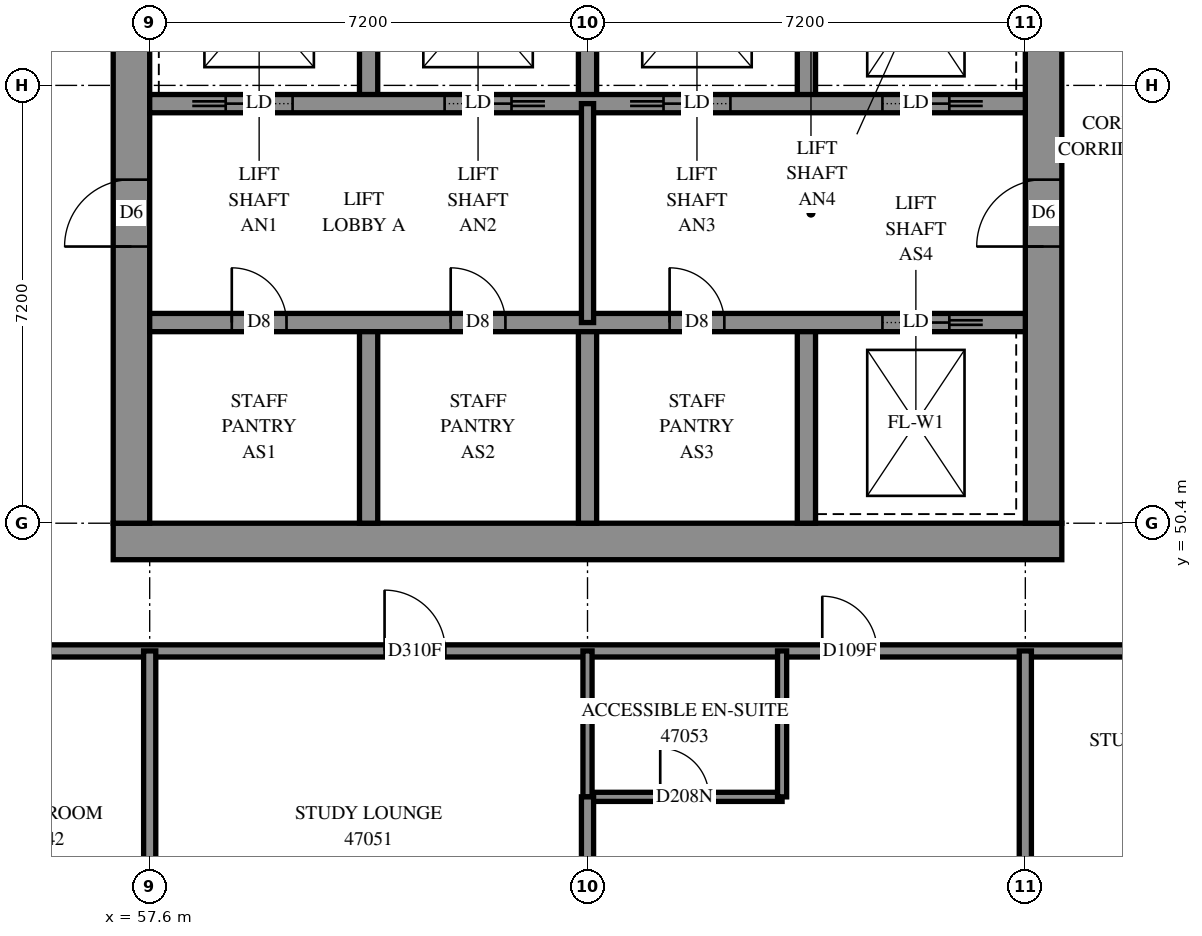
"""IFC4 building model, lengths in metres.
Left out: names, types, materials, properties, quantities, classifications, styles, units other than length and angle.
Written with IfcOpenShell. Run it as: python <this file> out.ifc"""

import sys

from ifc_helpers import new_model, si_unit, direction, frame, frame_2d, origin, place, context, subcontext, project, spatial, rectangle, extrude, element, fill, save


model = new_model("IFC4")
c1 = context("Model", 3, precision=1e-05, world=origin(), true_north=direction((0.0, 1.0)))
c2 = subcontext(c1, "Body", "Model", "MODEL_VIEW")
j1 = project(units=[si_unit("LENGTHUNIT", "METRE"), si_unit("PLANEANGLEUNIT", "RADIAN")], contexts=[c1])
p1 = place(None, origin())
s1 = spatial("IfcSite", under=j1, at=p1, CompositionType="ELEMENT")
p2 = place(p1, origin())
s2 = spatial("IfcBuilding", under=s1, at=p2, CompositionType="ELEMENT")
p3 = place(p2, frame((0.0, 0.0, 172.8)))
s3 = spatial("IfcBuildingStorey", under=s2, at=p3, CompositionType="ELEMENT", Elevation=172.8)
p4 = place(p3, frame((57.0, 50.1, -0.3), z_axis=(0.0, 0.0, 1.0), x_axis=(1.0, 0.0, 0.0)))
e1 = element("IfcWall", 1, at=p4, inside=s3, PredefinedType="SHEAR", context=c2, shape_type="SweptSolid", body=[
    extrude(rectangle(XDim=15.6, YDim=0.6, at=frame_2d((7.8, 0.0))), origin(), (0.0, 0.0, 1.0), 2.7),
])
p5 = place(p3, frame((57.3, 50.4, -0.3), z_axis=(0.0, 0.0, 1.0), x_axis=(0.0, 1.0, 0.0)))
e2 = element("IfcWall", 2, at=p5, inside=s3, PredefinedType="SHEAR", context=c2, shape_type="SweptSolid", body=[
    extrude(rectangle(XDim=14.4, YDim=0.6, at=frame_2d((7.2, 0.0))), origin(), (0.0, 0.0, 1.0), 2.7),
])
p6 = place(p5, frame((4.55, 0.0, 0.3)))
e3 = element("IfcOpeningElement", 3, at=p6, cuts=e2, PredefinedType="OPENING", context=c2, shape_type="SweptSolid", body=[
    extrude(rectangle(XDim=1.1, YDim=2.1, at=frame_2d((0.55, 1.05))), frame((0.0, 0.31, 0.0), z_axis=(0.0, -1.0, 0.0), x_axis=(1.0, 0.0, 0.0)), (0.0, 0.0, 1.0), 0.62),
])
p7 = place(p5, frame((11.35, 0.0, 0.3)))
e4 = element("IfcOpeningElement", 4, at=p7, cuts=e2, PredefinedType="OPENING", context=c2, shape_type="SweptSolid", body=[
    extrude(rectangle(XDim=1.1, YDim=2.1, at=frame_2d((0.55, 1.05))), frame((0.0, 0.31, 0.0), z_axis=(0.0, -1.0, 0.0), x_axis=(1.0, 0.0, 0.0)), (0.0, 0.0, 1.0), 0.62),
])
p8 = place(p3, frame((72.3, 50.4, -0.3), z_axis=(0.0, 0.0, 1.0), x_axis=(0.0, 1.0, 0.0)))
e5 = element("IfcWall", 5, at=p8, inside=s3, PredefinedType="SHEAR", context=c2, shape_type="SweptSolid", body=[
    extrude(rectangle(XDim=14.4, YDim=0.6, at=frame_2d((7.2, 0.0))), origin(), (0.0, 0.0, 1.0), 2.7),
])
p9 = place(p8, frame((4.55, 0.0, 0.3)))
e6 = element("IfcOpeningElement", 6, at=p9, cuts=e5, PredefinedType="OPENING", context=c2, shape_type="SweptSolid", body=[
    extrude(rectangle(XDim=1.1, YDim=2.1, at=frame_2d((0.55, 1.05))), frame((0.0, 0.31, 0.0), z_axis=(0.0, -1.0, 0.0), x_axis=(1.0, 0.0, 0.0)), (0.0, 0.0, 1.0), 0.62),
])
p10 = place(p8, frame((11.35, 0.0, 0.3)))
e7 = element("IfcOpeningElement", 7, at=p10, cuts=e5, PredefinedType="OPENING", context=c2, shape_type="SweptSolid", body=[
    extrude(rectangle(XDim=1.1, YDim=2.1, at=frame_2d((0.55, 1.05))), frame((0.0, 0.31, 0.0), z_axis=(0.0, -1.0, 0.0), x_axis=(1.0, 0.0, 0.0)), (0.0, 0.0, 1.0), 0.62),
])
for number, where, z_axis, x_axis in (
    (8, (61.2, 50.4, 0.0), (0.0, 0.0, 1.0), (0.0, 1.0, 0.0)),
    (9, (61.2, 57.3, 0.0), (0.0, 0.0, 1.0), (0.0, 1.0, 0.0)),
    (10, (64.8, 50.4, 0.0), (0.0, 0.0, 1.0), (0.0, 1.0, 0.0)),
    (11, (64.8, 57.3, 0.0), (0.0, 0.0, 1.0), (0.0, 1.0, 0.0)),
    (12, (68.4, 50.4, 0.0), (0.0, 0.0, 1.0), (0.0, 1.0, 0.0)),
    (13, (68.4, 57.3, 0.0), (0.0, 0.0, 1.0), (0.0, 1.0, 0.0)),
):
    element("IfcWall", number, at=place(p3, frame(where, z_axis=z_axis, x_axis=x_axis)), inside=s3, PredefinedType="SOLIDWALL", context=c2, shape_type="SweptSolid", body=[
        extrude(rectangle(XDim=3.3, YDim=0.3, at=frame_2d((1.65, 0.0))), origin(), (0.0, 0.0, 1.0), 3.1),
    ])
p11 = place(p3, frame((57.6, 53.7, 0.0), z_axis=(0.0, 0.0, 1.0), x_axis=(1.0, 0.0, 0.0)))
e14 = element("IfcWall", 14, at=p11, inside=s3, PredefinedType="SOLIDWALL", context=c2, shape_type="SweptSolid", body=[
    extrude(rectangle(XDim=14.4, YDim=0.3, at=frame_2d((7.2, 0.0))), origin(), (0.0, 0.0, 1.0), 3.1),
])
p12 = place(p11, frame((1.35, 0.0, 0.0)))
e15 = element("IfcOpeningElement", 15, at=p12, cuts=e14, PredefinedType="OPENING", context=c2, shape_type="SweptSolid", body=[
    extrude(rectangle(XDim=0.9, YDim=2.1, at=frame_2d((0.45, 1.05))), frame((0.0, 0.16, 0.0), z_axis=(0.0, -1.0, 0.0), x_axis=(1.0, 0.0, 0.0)), (0.0, 0.0, 1.0), 0.32),
])
p13 = place(p11, frame((4.95, 0.0, 0.0)))
e16 = element("IfcOpeningElement", 16, at=p13, cuts=e14, PredefinedType="OPENING", context=c2, shape_type="SweptSolid", body=[
    extrude(rectangle(XDim=0.9, YDim=2.1, at=frame_2d((0.45, 1.05))), frame((0.0, 0.16, 0.0), z_axis=(0.0, -1.0, 0.0), x_axis=(1.0, 0.0, 0.0)), (0.0, 0.0, 1.0), 0.32),
])
p14 = place(p11, frame((8.55, 0.0, 0.0)))
e17 = element("IfcOpeningElement", 17, at=p14, cuts=e14, PredefinedType="OPENING", context=c2, shape_type="SweptSolid", body=[
    extrude(rectangle(XDim=0.9, YDim=2.1, at=frame_2d((0.45, 1.05))), frame((0.0, 0.16, 0.0), z_axis=(0.0, -1.0, 0.0), x_axis=(1.0, 0.0, 0.0)), (0.0, 0.0, 1.0), 0.32),
])
p15 = place(p11, frame((12.05, 0.0, 0.0)))
e18 = element("IfcOpeningElement", 18, at=p15, cuts=e14, PredefinedType="OPENING", context=c2, shape_type="SweptSolid", body=[
    extrude(rectangle(XDim=1.1, YDim=2.1, at=frame_2d((0.55, 1.05))), frame((0.0, 0.16, 0.0), z_axis=(0.0, -1.0, 0.0), x_axis=(1.0, 0.0, 0.0)), (0.0, 0.0, 1.0), 0.32),
])
p16 = place(p3, frame((57.6, 57.3, 0.0), z_axis=(0.0, 0.0, 1.0), x_axis=(1.0, 0.0, 0.0)))
e19 = element("IfcWall", 19, at=p16, inside=s3, PredefinedType="SOLIDWALL", context=c2, shape_type="SweptSolid", body=[
    extrude(rectangle(XDim=14.4, YDim=0.3, at=frame_2d((7.2, 0.0))), origin(), (0.0, 0.0, 1.0), 3.1),
])
p17 = place(p16, frame((1.25, 0.0, 0.0)))
e20 = element("IfcOpeningElement", 20, at=p17, cuts=e19, PredefinedType="OPENING", context=c2, shape_type="SweptSolid", body=[
    extrude(rectangle(XDim=1.1, YDim=2.1, at=frame_2d((0.55, 1.05))), frame((0.0, 0.16, 0.0), z_axis=(0.0, -1.0, 0.0), x_axis=(1.0, 0.0, 0.0)), (0.0, 0.0, 1.0), 0.32),
])
p18 = place(p16, frame((4.85, 0.0, 0.0)))
e21 = element("IfcOpeningElement", 21, at=p18, cuts=e19, PredefinedType="OPENING", context=c2, shape_type="SweptSolid", body=[
    extrude(rectangle(XDim=1.1, YDim=2.1, at=frame_2d((0.55, 1.05))), frame((0.0, 0.16, 0.0), z_axis=(0.0, -1.0, 0.0), x_axis=(1.0, 0.0, 0.0)), (0.0, 0.0, 1.0), 0.32),
])
p19 = place(p16, frame((8.45, 0.0, 0.0)))
e22 = element("IfcOpeningElement", 22, at=p19, cuts=e19, PredefinedType="OPENING", context=c2, shape_type="SweptSolid", body=[
    extrude(rectangle(XDim=1.1, YDim=2.1, at=frame_2d((0.55, 1.05))), frame((0.0, 0.16, 0.0), z_axis=(0.0, -1.0, 0.0), x_axis=(1.0, 0.0, 0.0)), (0.0, 0.0, 1.0), 0.32),
])
p20 = place(p16, frame((12.05, 0.0, 0.0)))
e23 = element("IfcOpeningElement", 23, at=p20, cuts=e19, PredefinedType="OPENING", context=c2, shape_type="SweptSolid", body=[
    extrude(rectangle(XDim=1.1, YDim=2.1, at=frame_2d((0.55, 1.05))), frame((0.0, 0.16, 0.0), z_axis=(0.0, -1.0, 0.0), x_axis=(1.0, 0.0, 0.0)), (0.0, 0.0, 1.0), 0.32),
])
p21 = place(p3, frame((64.8, 53.7, 0.0), z_axis=(0.0, 0.0, 1.0), x_axis=(0.0, 1.0, 0.0)))
e24 = element("IfcWall", 24, at=p21, inside=s3, PredefinedType="PARTITIONING", context=c2, shape_type="SweptSolid", body=[
    extrude(rectangle(XDim=3.6, YDim=0.2, at=frame_2d((1.8, 0.0))), origin(), (0.0, 0.0, 1.0), 3.1),
])
p22 = place(p3, frame((55.5, 48.3, 0.0), z_axis=(0.0, 0.0, 1.0), x_axis=(1.0, 0.0, 0.0)))
e25 = element("IfcWall", 25, at=p22, inside=s3, PredefinedType="PARTITIONING", context=c2, shape_type="SweptSolid", body=[
    extrude(rectangle(XDim=18.974, YDim=0.2, at=frame_2d((9.487, 0.0))), origin(), (0.0, 0.0, 1.0), 3.1),
])
p23 = place(p22, frame((5.963, 0.0, 0.0)))
e26 = element("IfcOpeningElement", 26, at=p23, cuts=e25, PredefinedType="OPENING", context=c2, shape_type="SweptSolid", body=[
    extrude(rectangle(XDim=1.0, YDim=2.1, at=frame_2d((0.5, 1.05))), frame((0.0, 0.11, 0.0), z_axis=(0.0, -1.0, 0.0), x_axis=(1.0, 0.0, 0.0)), (0.0, 0.0, 1.0), 0.22),
])
p24 = place(p22, frame((13.161, 0.0, 0.0)))
e27 = element("IfcOpeningElement", 27, at=p24, cuts=e25, PredefinedType="OPENING", context=c2, shape_type="SweptSolid", body=[
    extrude(rectangle(XDim=0.9, YDim=2.1, at=frame_2d((0.45, 1.05))), frame((0.0, 0.11, 0.0), z_axis=(0.0, -1.0, 0.0), x_axis=(1.0, 0.0, 0.0)), (0.0, 0.0, 1.0), 0.22),
])
for number, where, z_axis, x_axis in (
    (28, (57.6, 43.65, 0.0), (0.0, 0.0, 1.0), (0.0, 1.0, 0.0)),
    (29, (72.0, 43.65, 0.0), (0.0, 0.0, 1.0), (0.0, 1.0, 0.0)),
):
    element("IfcWall", number, at=place(p3, frame(where, z_axis=z_axis, x_axis=x_axis)), inside=s3, PredefinedType="PARTITIONING", context=c2, shape_type="SweptSolid", body=[
        extrude(rectangle(XDim=4.65, YDim=0.2, at=frame_2d((2.325, 0.0))), origin(), (0.0, 0.0, 1.0), 3.1),
    ])
p25 = place(p3, frame((64.8, 45.9, 0.0), z_axis=(0.0, 0.0, 1.0), x_axis=(1.0, 0.0, 0.0)))
e30 = element("IfcWall", 30, at=p25, inside=s3, PredefinedType="PARTITIONING", context=c2, shape_type="SweptSolid", body=[
    extrude(rectangle(XDim=3.2, YDim=0.15, at=frame_2d((1.6, 0.0))), origin(), (0.0, 0.0, 1.0), 3.1),
])
p26 = place(p25, frame((1.196, 0.0, 0.0)))
e31 = element("IfcOpeningElement", 31, at=p26, cuts=e30, PredefinedType="OPENING", context=c2, shape_type="SweptSolid", body=[
    extrude(rectangle(XDim=0.8, YDim=2.1, at=frame_2d((0.4, 1.05))), frame((0.0, 0.085, 0.0), z_axis=(0.0, -1.0, 0.0), x_axis=(1.0, 0.0, 0.0)), (0.0, 0.0, 1.0), 0.17),
])
for number, where, z_axis, x_axis in (
    (32, (68.0, 45.9, 0.0), (0.0, 0.0, 1.0), (0.0, 1.0, 0.0)),
    (33, (64.8, 45.9, 0.0), (0.0, 0.0, 1.0), (0.0, 1.0, 0.0)),
):
    element("IfcWall", number, at=place(p3, frame(where, z_axis=z_axis, x_axis=x_axis)), inside=s3, PredefinedType="PARTITIONING", context=c2, shape_type="SweptSolid", body=[
        extrude(rectangle(XDim=2.4, YDim=0.15, at=frame_2d((1.2, 0.0))), origin(), (0.0, 0.0, 1.0), 3.1),
    ])
p27 = place(p3, frame((64.8, 43.65, 0.0), z_axis=(0.0, 0.0, 1.0), x_axis=(0.0, 1.0, 0.0)))
e34 = element("IfcWall", 34, at=p27, inside=s3, PredefinedType="PARTITIONING", context=c2, shape_type="SweptSolid", body=[
    extrude(rectangle(XDim=2.25, YDim=0.2, at=frame_2d((1.125, 0.0))), origin(), (0.0, 0.0, 1.0), 3.1),
])
p28 = place(p6, origin())
e35 = element("IfcDoor", 35, at=p28, inside=s3, OperationType="DOUBLE_DOOR_SINGLE_SWING", PredefinedType="DOOR", context=c2, shape_type="SweptSolid", body=[
    extrude(rectangle(XDim=1.1, YDim=2.1, at=frame_2d((0.55, 1.05))), frame((0.0, 0.025, 0.0), z_axis=(0.0, -1.0, 0.0), x_axis=(1.0, 0.0, 0.0)), (0.0, 0.0, 1.0), 0.05),
])
fill(e3, e35)
p29 = place(p9, origin())
e36 = element("IfcDoor", 36, at=p29, inside=s3, OperationType="DOUBLE_DOOR_SINGLE_SWING", PredefinedType="DOOR", context=c2, shape_type="SweptSolid", body=[
    extrude(rectangle(XDim=1.1, YDim=2.1, at=frame_2d((0.55, 1.05))), frame((0.0, 0.025, 0.0), z_axis=(0.0, -1.0, 0.0), x_axis=(1.0, 0.0, 0.0)), (0.0, 0.0, 1.0), 0.05),
])
fill(e6, e36)
p30 = place(p12, origin())
e37 = element("IfcDoor", 37, at=p30, inside=s3, OperationType="SINGLE_SWING_LEFT", PredefinedType="DOOR", context=c2, shape_type="SweptSolid", body=[
    extrude(rectangle(XDim=0.9, YDim=2.1, at=frame_2d((0.45, 1.05))), frame((0.0, 0.025, 0.0), z_axis=(0.0, -1.0, 0.0), x_axis=(1.0, 0.0, 0.0)), (0.0, 0.0, 1.0), 0.05),
])
fill(e15, e37)
p31 = place(p13, origin())
e38 = element("IfcDoor", 38, at=p31, inside=s3, OperationType="SINGLE_SWING_LEFT", PredefinedType="DOOR", context=c2, shape_type="SweptSolid", body=[
    extrude(rectangle(XDim=0.9, YDim=2.1, at=frame_2d((0.45, 1.05))), frame((0.0, 0.025, 0.0), z_axis=(0.0, -1.0, 0.0), x_axis=(1.0, 0.0, 0.0)), (0.0, 0.0, 1.0), 0.05),
])
fill(e16, e38)
p32 = place(p14, origin())
e39 = element("IfcDoor", 39, at=p32, inside=s3, OperationType="SINGLE_SWING_LEFT", PredefinedType="DOOR", context=c2, shape_type="SweptSolid", body=[
    extrude(rectangle(XDim=0.9, YDim=2.1, at=frame_2d((0.45, 1.05))), frame((0.0, 0.025, 0.0), z_axis=(0.0, -1.0, 0.0), x_axis=(1.0, 0.0, 0.0)), (0.0, 0.0, 1.0), 0.05),
])
fill(e17, e39)
p33 = place(p15, origin())
e40 = element("IfcDoor", 40, at=p33, inside=s3, OperationType="SLIDING_TO_RIGHT", PredefinedType="DOOR", context=c2, shape_type="SweptSolid", body=[
    extrude(rectangle(XDim=1.1, YDim=2.1, at=frame_2d((0.55, 1.05))), frame((0.0, 0.025, 0.0), z_axis=(0.0, -1.0, 0.0), x_axis=(1.0, 0.0, 0.0)), (0.0, 0.0, 1.0), 0.05),
])
fill(e18, e40)
p34 = place(p17, origin())
e41 = element("IfcDoor", 41, at=p34, inside=s3, OperationType="SLIDING_TO_LEFT", PredefinedType="DOOR", context=c2, shape_type="SweptSolid", body=[
    extrude(rectangle(XDim=1.1, YDim=2.1, at=frame_2d((0.55, 1.05))), frame((0.0, 0.025, 0.0), z_axis=(0.0, -1.0, 0.0), x_axis=(1.0, 0.0, 0.0)), (0.0, 0.0, 1.0), 0.05),
])
fill(e20, e41)
p35 = place(p18, origin())
e42 = element("IfcDoor", 42, at=p35, inside=s3, OperationType="SLIDING_TO_RIGHT", PredefinedType="DOOR", context=c2, shape_type="SweptSolid", body=[
    extrude(rectangle(XDim=1.1, YDim=2.1, at=frame_2d((0.55, 1.05))), frame((0.0, 0.025, 0.0), z_axis=(0.0, -1.0, 0.0), x_axis=(1.0, 0.0, 0.0)), (0.0, 0.0, 1.0), 0.05),
])
fill(e21, e42)
p36 = place(p19, origin())
e43 = element("IfcDoor", 43, at=p36, inside=s3, OperationType="SLIDING_TO_LEFT", PredefinedType="DOOR", context=c2, shape_type="SweptSolid", body=[
    extrude(rectangle(XDim=1.1, YDim=2.1, at=frame_2d((0.55, 1.05))), frame((0.0, 0.025, 0.0), z_axis=(0.0, -1.0, 0.0), x_axis=(1.0, 0.0, 0.0)), (0.0, 0.0, 1.0), 0.05),
])
fill(e22, e43)
p37 = place(p20, origin())
e44 = element("IfcDoor", 44, at=p37, inside=s3, OperationType="SLIDING_TO_RIGHT", PredefinedType="DOOR", context=c2, shape_type="SweptSolid", body=[
    extrude(rectangle(XDim=1.1, YDim=2.1, at=frame_2d((0.55, 1.05))), frame((0.0, 0.025, 0.0), z_axis=(0.0, -1.0, 0.0), x_axis=(1.0, 0.0, 0.0)), (0.0, 0.0, 1.0), 0.05),
])
fill(e23, e44)
p38 = place(p23, origin())
e45 = element("IfcDoor", 45, at=p38, inside=s3, OperationType="SINGLE_SWING_LEFT", PredefinedType="DOOR", context=c2, shape_type="SweptSolid", body=[
    extrude(rectangle(XDim=1.0, YDim=2.1, at=frame_2d((0.5, 1.05))), frame((0.0, 0.025, 0.0), z_axis=(0.0, -1.0, 0.0), x_axis=(1.0, 0.0, 0.0)), (0.0, 0.0, 1.0), 0.05),
])
fill(e26, e45)
p39 = place(p24, origin())
e46 = element("IfcDoor", 46, at=p39, inside=s3, OperationType="SINGLE_SWING_LEFT", PredefinedType="DOOR", context=c2, shape_type="SweptSolid", body=[
    extrude(rectangle(XDim=0.9, YDim=2.1, at=frame_2d((0.45, 1.05))), frame((0.0, 0.025, 0.0), z_axis=(0.0, -1.0, 0.0), x_axis=(1.0, 0.0, 0.0)), (0.0, 0.0, 1.0), 0.05),
])
fill(e27, e46)
p40 = place(p26, origin())
e47 = element("IfcDoor", 47, at=p40, inside=s3, OperationType="SINGLE_SWING_RIGHT", PredefinedType="DOOR", context=c2, shape_type="SweptSolid", body=[
    extrude(rectangle(XDim=0.8, YDim=2.1, at=frame_2d((0.4, 1.05))), frame((0.0, 0.025, 0.0), z_axis=(0.0, -1.0, 0.0), x_axis=(1.0, 0.0, 0.0)), (0.0, 0.0, 1.0), 0.05),
])
fill(e31, e47)
save(model, sys.argv[1])
